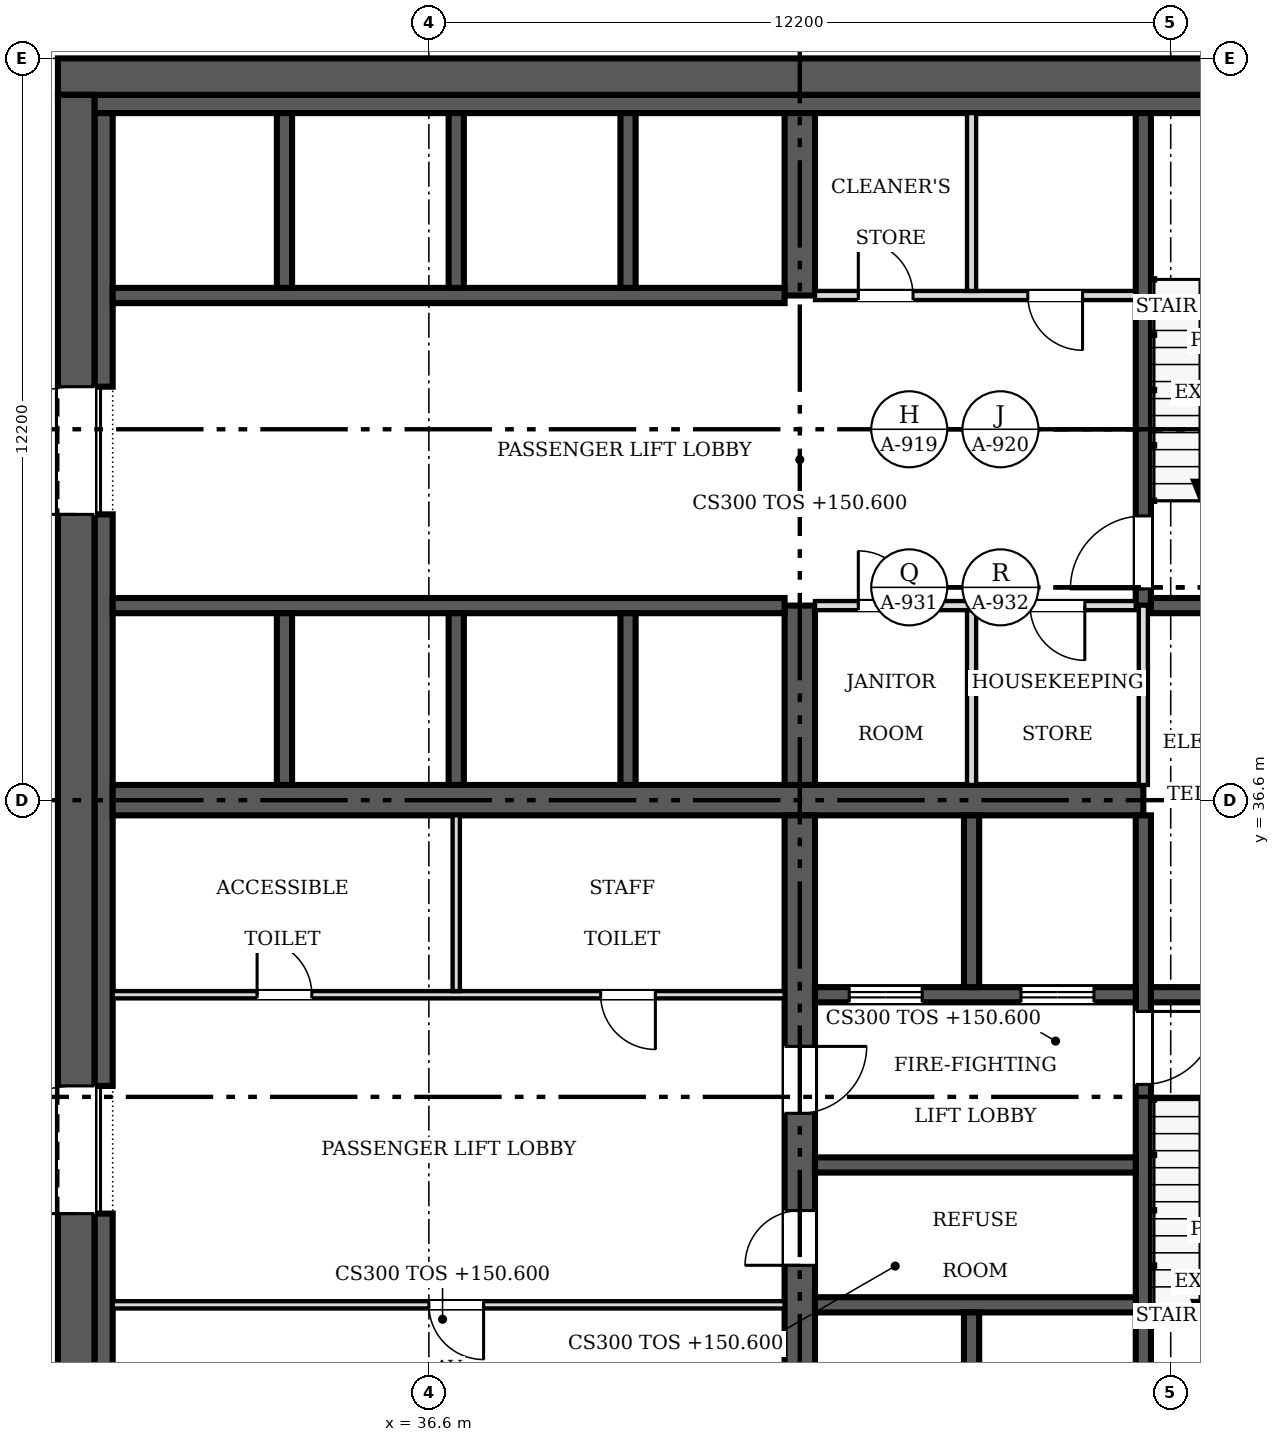
"""IFC4 building model, lengths in metres.
Left out: names, types, materials, properties, quantities, classifications, styles, units other than length and angle.
Written with IfcOpenShell. Run it as: python <this file> out.ifc"""

import sys

from ifc_helpers import new_model, si_unit, direction, frame, frame_2d, origin, place, context, subcontext, project, spatial, rectangle, extrude, source, transform, mapped, element, fill, save


model = new_model("IFC4")
c1 = context("Model", 3, precision=1e-05, world=origin(), true_north=direction((0.0, 1.0)))
c2 = subcontext(c1, "Body", "Model", "MODEL_VIEW")
j1 = project(units=[si_unit("LENGTHUNIT", "METRE"), si_unit("PLANEANGLEUNIT", "RADIAN")], contexts=[c1])
p1 = place(None, origin())
s1 = spatial("IfcSite", under=j1, at=p1, CompositionType="ELEMENT")
p2 = place(p1, origin())
s2 = spatial("IfcBuilding", under=s1, at=p2, CompositionType="ELEMENT")
p3 = place(p2, frame((0.0, 0.0, 150.6)))
s3 = spatial("IfcBuildingStorey", under=s2, at=p3, CompositionType="ELEMENT", Elevation=150.6)
p4 = place(p3, frame((30.8, 25.0, 0.0), z_axis=(0.0, 0.0, 1.0), x_axis=(0.0, 1.0, 0.0)))
e1 = element("IfcWall", 1, at=p4, inside=s3, PredefinedType="SHEAR", context=c2, shape_type="SweptSolid", body=[
    extrude(rectangle(XDim=23.2, YDim=0.6, at=frame_2d((11.6, 0.0))), origin(), (0.0, 0.0, 1.0), 4.8),
])
m1 = source(origin(), c2, "Body", "SweptSolid", [
    extrude(rectangle(XDim=2.1, YDim=2.4, at=frame_2d((1.05, 1.2))), frame((0.0, 0.31, 0.0), z_axis=(0.0, -1.0, 0.0), x_axis=(1.0, 0.0, 0.0)), (0.0, 0.0, 1.0), 0.62),
])
p5 = place(p4, frame((4.8, 0.0, 0.0)))
e2 = element("IfcOpeningElement", 2, at=p5, cuts=e1, PredefinedType="OPENING", context=c2, shape_type="MappedRepresentation", body=[
    mapped(m1, transform((0.0, 0.0, 0.0), scale=1.0)),
])
p6 = place(p4, frame((16.3, 0.0, 0.0)))
e3 = element("IfcOpeningElement", 3, at=p6, cuts=e1, PredefinedType="OPENING", context=c2, shape_type="MappedRepresentation", body=[
    mapped(m1, transform((0.0, 0.0, 0.0), scale=1.0)),
])
p7 = place(p3, frame((30.5, 48.5, 0.0), z_axis=(0.0, 0.0, 1.0), x_axis=(1.0, 0.0, 0.0)))
e4 = element("IfcWall", 4, at=p7, inside=s3, PredefinedType="SHEAR", context=c2, shape_type="SweptSolid", body=[
    extrude(rectangle(XDim=24.4, YDim=0.6, at=frame_2d((12.2, 0.0))), origin(), (0.0, 0.0, 1.0), 4.8),
])
p8 = place(p3, frame((31.1, 48.05, 0.0), z_axis=(0.0, 0.0, 1.0), x_axis=(1.0, 0.0, 0.0)))
e5 = element("IfcWall", 5, at=p8, inside=s3, PredefinedType="SOLIDWALL", context=c2, shape_type="SweptSolid", body=[
    extrude(rectangle(XDim=23.2, YDim=0.3, at=frame_2d((11.6, 0.0))), origin(), (0.0, 0.0, 1.0), 4.8),
])
p9 = place(p3, frame((31.25, 25.3, 0.0), z_axis=(0.0, 0.0, 1.0), x_axis=(0.0, 1.0, 0.0)))
e6 = element("IfcWall", 6, at=p9, inside=s3, PredefinedType="SOLIDWALL", context=c2, shape_type="SweptSolid", body=[
    extrude(rectangle(XDim=4.5, YDim=0.3, at=frame_2d((2.25, 0.0))), origin(), (0.0, 0.0, 1.0), 4.8),
])
p10 = place(p3, frame((31.25, 31.9, 0.0), z_axis=(0.0, 0.0, 1.0), x_axis=(0.0, 1.0, 0.0)))
e7 = element("IfcWall", 7, at=p10, inside=s3, PredefinedType="SOLIDWALL", context=c2, shape_type="SweptSolid", body=[
    extrude(rectangle(XDim=9.4, YDim=0.3, at=frame_2d((4.7, 0.0))), origin(), (0.0, 0.0, 1.0), 4.8),
])
p11 = place(p3, frame((31.25, 43.4, 0.0), z_axis=(0.0, 0.0, 1.0), x_axis=(0.0, 1.0, 0.0)))
e8 = element("IfcWall", 8, at=p11, inside=s3, PredefinedType="SOLIDWALL", context=c2, shape_type="SweptSolid", body=[
    extrude(rectangle(XDim=4.5, YDim=0.3, at=frame_2d((2.25, 0.0))), origin(), (0.0, 0.0, 1.0), 4.8),
])
p12 = place(p3, frame((31.4, 36.6, 0.0), z_axis=(0.0, 0.0, 1.0), x_axis=(1.0, 0.0, 0.0)))
e9 = element("IfcWall", 9, at=p12, inside=s3, PredefinedType="SHEAR", context=c2, shape_type="SweptSolid", body=[
    extrude(rectangle(XDim=16.95, YDim=0.5, at=frame_2d((8.475, 0.0))), origin(), (0.0, 0.0, 1.0), 4.8),
])
p13 = place(p3, frame((42.7, 36.35, 0.0), z_axis=(0.0, 0.0, 1.0), x_axis=(0.0, -1.0, 0.0)))
e10 = element("IfcWall", 10, at=p13, inside=s3, PredefinedType="SHEAR", context=c2, shape_type="SweptSolid", body=[
    extrude(rectangle(XDim=11.05, YDim=0.5, at=frame_2d((5.525, 0.0))), origin(), (0.0, 0.0, 1.0), 4.8),
])
m2 = source(origin(), c2, "Body", "SweptSolid", [
    extrude(rectangle(XDim=0.9, YDim=2.1, at=frame_2d((0.45, 1.05))), frame((0.0, 0.26, 0.0), z_axis=(0.0, -1.0, 0.0), x_axis=(1.0, 0.0, 0.0)), (0.0, 0.0, 1.0), 0.52),
])
p14 = place(p13, frame((6.5, 0.0, 0.0)))
e11 = element("IfcOpeningElement", 11, at=p14, cuts=e10, PredefinedType="OPENING", context=c2, shape_type="MappedRepresentation", body=[
    mapped(m2, transform((0.0, 0.0, 0.0), scale=1.0)),
])
m3 = source(origin(), c2, "Body", "SweptSolid", [
    extrude(rectangle(XDim=1.1, YDim=2.1, at=frame_2d((0.55, 1.05))), frame((0.0, 0.26, 0.0), z_axis=(0.0, -1.0, 0.0), x_axis=(1.0, 0.0, 0.0)), (0.0, 0.0, 1.0), 0.52),
])
p15 = place(p13, frame((3.8, 0.0, 0.0)))
e12 = element("IfcOpeningElement", 12, at=p15, cuts=e10, PredefinedType="OPENING", context=c2, shape_type="MappedRepresentation", body=[
    mapped(m3, transform((0.0, 0.0, 0.0), scale=1.0)),
])
p16 = place(p3, frame((42.7, 36.85, 0.0), z_axis=(0.0, 0.0, 1.0), x_axis=(0.0, 1.0, 0.0)))
e13 = element("IfcWall", 13, at=p16, inside=s3, PredefinedType="SHEAR", context=c2, shape_type="SweptSolid", body=[
    extrude(rectangle(XDim=2.95, YDim=0.5, at=frame_2d((1.475, 0.0))), origin(), (0.0, 0.0, 1.0), 4.8),
])
p17 = place(p3, frame((42.7, 44.9, 0.0), z_axis=(0.0, 0.0, 1.0), x_axis=(0.0, 1.0, 0.0)))
e14 = element("IfcWall", 14, at=p17, inside=s3, PredefinedType="SHEAR", context=c2, shape_type="SweptSolid", body=[
    extrude(rectangle(XDim=3.0, YDim=0.5, at=frame_2d((1.5, 0.0))), origin(), (0.0, 0.0, 1.0), 4.8),
])
for number, where, z_axis, x_axis in (
    (15, (31.4, 39.8, 0.0), (0.0, 0.0, 1.0), (1.0, 0.0, 0.0)),
    (16, (31.4, 44.9, 0.0), (0.0, 0.0, 1.0), (1.0, 0.0, 0.0)),
):
    element("IfcWall", number, at=place(p3, frame(where, z_axis=z_axis, x_axis=x_axis)), inside=s3, PredefinedType="SOLIDWALL", context=c2, shape_type="SweptSolid", body=[
        extrude(rectangle(XDim=11.05, YDim=0.25, at=frame_2d((5.525, 0.0))), origin(), (0.0, 0.0, 1.0), 4.8),
    ])
p18 = place(p3, frame((48.35, 36.35, 0.0), z_axis=(0.0, 0.0, 1.0), x_axis=(0.0, -1.0, 0.0)))
e17 = element("IfcWall", 17, at=p18, inside=s3, PredefinedType="SOLIDWALL", context=c2, shape_type="SweptSolid", body=[
    extrude(rectangle(XDim=11.05, YDim=0.25, at=frame_2d((5.525, 0.0))), origin(), (0.0, 0.0, 1.0), 4.8),
])
m4 = source(origin(), c2, "Body", "SweptSolid", [
    extrude(rectangle(XDim=1.2, YDim=2.1, at=frame_2d((0.6, 1.05))), frame((0.0, 0.135, 0.0), z_axis=(0.0, -1.0, 0.0), x_axis=(1.0, 0.0, 0.0)), (0.0, 0.0, 1.0), 0.27),
])
p19 = place(p18, frame((3.225, 0.0, 0.0)))
e18 = element("IfcOpeningElement", 18, at=p19, cuts=e17, PredefinedType="OPENING", context=c2, shape_type="MappedRepresentation", body=[
    mapped(m4, transform((0.0, 0.0, 0.0), scale=1.0)),
])
p20 = place(p3, frame((48.225, 33.4, 0.0), z_axis=(0.0, 0.0, 1.0), x_axis=(-1.0, 0.0, 0.0)))
e19 = element("IfcWall", 19, at=p20, inside=s3, PredefinedType="SOLIDWALL", context=c2, shape_type="SweptSolid", body=[
    extrude(rectangle(XDim=5.275, YDim=0.25, at=frame_2d((2.638, 0.0))), origin(), (0.0, 0.0, 1.0), 4.8),
])
p21 = place(p20, frame((3.512, 0.0, 0.0)))
e20 = element("IfcOpeningElement", 20, at=p21, cuts=e19, PredefinedType="OPENING", context=c2, shape_type="MappedRepresentation", body=[
    mapped(m4, transform((0.0, 0.0, 0.0), scale=1.0)),
])
p22 = place(p20, frame((0.688, 0.0, 0.0)))
e21 = element("IfcOpeningElement", 21, at=p22, cuts=e19, PredefinedType="OPENING", context=c2, shape_type="MappedRepresentation", body=[
    mapped(m4, transform((0.0, 0.0, 0.0), scale=1.0)),
])
p23 = place(p3, frame((48.475, 33.4, 0.0), z_axis=(0.0, 0.0, 1.0), x_axis=(1.0, 0.0, 0.0)))
e22 = element("IfcWall", 22, at=p23, inside=s3, PredefinedType="SOLIDWALL", context=c2, shape_type="SweptSolid", body=[
    extrude(rectangle(XDim=3.525, YDim=0.25, at=frame_2d((1.762, 0.0))), origin(), (0.0, 0.0, 1.0), 4.8),
])
p24 = place(p3, frame((48.35, 47.9, 0.0), z_axis=(0.0, 0.0, 1.0), x_axis=(0.0, -1.0, 0.0)))
e23 = element("IfcWall", 23, at=p24, inside=s3, PredefinedType="SOLIDWALL", context=c2, shape_type="SweptSolid", body=[
    extrude(rectangle(XDim=8.1, YDim=0.25, at=frame_2d((4.05, 0.0))), origin(), (0.0, 0.0, 1.0), 4.8),
])
p25 = place(p24, frame((6.625, 0.0, 0.0)))
e24 = element("IfcOpeningElement", 24, at=p25, cuts=e23, PredefinedType="OPENING", context=c2, shape_type="MappedRepresentation", body=[
    mapped(m4, transform((0.0, 0.0, 0.0), scale=1.0)),
])
for number, where, z_axis, x_axis in (
    (25, (42.95, 28.3, 0.0), (0.0, 0.0, 1.0), (1.0, 0.0, 0.0)),
    (26, (42.95, 30.6, 0.0), (0.0, 0.0, 1.0), (1.0, 0.0, 0.0)),
):
    element("IfcWall", number, at=place(p3, frame(where, z_axis=z_axis, x_axis=x_axis)), inside=s3, PredefinedType="SOLIDWALL", context=c2, shape_type="SweptSolid", body=[
        extrude(rectangle(XDim=5.275, YDim=0.25, at=frame_2d((2.638, 0.0))), origin(), (0.0, 0.0, 1.0), 4.8),
    ])
p26 = place(p3, frame((48.475, 39.8, 0.0), z_axis=(0.0, 0.0, 1.0), x_axis=(1.0, 0.0, 0.0)))
e27 = element("IfcWall", 27, at=p26, inside=s3, PredefinedType="SOLIDWALL", context=c2, shape_type="SweptSolid", body=[
    extrude(rectangle(XDim=3.4, YDim=0.25, at=frame_2d((1.7, 0.0))), origin(), (0.0, 0.0, 1.0), 4.8),
])
for number, where, z_axis, x_axis in (
    (28, (34.225, 36.85, 0.0), (0.0, 0.0, 1.0), (0.0, 1.0, 0.0)),
    (29, (37.05, 36.85, 0.0), (0.0, 0.0, 1.0), (0.0, 1.0, 0.0)),
    (30, (39.875, 36.85, 0.0), (0.0, 0.0, 1.0), (0.0, 1.0, 0.0)),
):
    element("IfcWall", number, at=place(p3, frame(where, z_axis=z_axis, x_axis=x_axis)), inside=s3, PredefinedType="SOLIDWALL", context=c2, shape_type="SweptSolid", body=[
        extrude(rectangle(XDim=2.825, YDim=0.25, at=frame_2d((1.413, 0.0))), origin(), (0.0, 0.0, 1.0), 4.8),
    ])
p27 = place(p3, frame((45.525, 33.525, 0.0), z_axis=(0.0, 0.0, 1.0), x_axis=(0.0, 1.0, 0.0)))
e31 = element("IfcWall", 31, at=p27, inside=s3, PredefinedType="SOLIDWALL", context=c2, shape_type="SweptSolid", body=[
    extrude(rectangle(XDim=2.825, YDim=0.25, at=frame_2d((1.413, 0.0))), origin(), (0.0, 0.0, 1.0), 4.8),
])
for number, where, z_axis, x_axis in (
    (32, (34.225, 45.025, 0.0), (0.0, 0.0, 1.0), (0.0, 1.0, 0.0)),
    (33, (37.05, 45.025, 0.0), (0.0, 0.0, 1.0), (0.0, 1.0, 0.0)),
    (34, (39.875, 45.025, 0.0), (0.0, 0.0, 1.0), (0.0, 1.0, 0.0)),
    (35, (45.525, 25.3, 0.0), (0.0, 0.0, 1.0), (0.0, 1.0, 0.0)),
):
    element("IfcWall", number, at=place(p3, frame(where, z_axis=z_axis, x_axis=x_axis)), inside=s3, PredefinedType="SOLIDWALL", context=c2, shape_type="SweptSolid", body=[
        extrude(rectangle(XDim=2.875, YDim=0.25, at=frame_2d((1.438, 0.0))), origin(), (0.0, 0.0, 1.0), 4.8),
    ])
p28 = place(p3, frame((42.45, 28.3, 0.0), z_axis=(0.0, 0.0, 1.0), x_axis=(-1.0, 0.0, 0.0)))
e36 = element("IfcWall", 36, at=p28, inside=s3, PredefinedType="PARTITIONING", context=c2, shape_type="SweptSolid", body=[
    extrude(rectangle(XDim=11.05, YDim=0.12, at=frame_2d((5.525, 0.0))), origin(), (0.0, 0.0, 1.0), 4.6),
])
m5 = source(origin(), c2, "Body", "SweptSolid", [
    extrude(rectangle(XDim=0.9, YDim=2.1, at=frame_2d((0.45, 1.05))), frame((0.0, 0.07, 0.0), z_axis=(0.0, -1.0, 0.0), x_axis=(1.0, 0.0, 0.0)), (0.0, 0.0, 1.0), 0.14),
])
p29 = place(p28, frame((4.95, 0.0, 0.0)))
e37 = element("IfcOpeningElement", 37, at=p29, cuts=e36, PredefinedType="OPENING", context=c2, shape_type="MappedRepresentation", body=[
    mapped(m5, transform((0.0, 0.0, 0.0), scale=1.0)),
])
p30 = place(p3, frame((31.4, 33.4, 0.0), z_axis=(0.0, 0.0, 1.0), x_axis=(1.0, 0.0, 0.0)))
e38 = element("IfcWall", 38, at=p30, inside=s3, PredefinedType="PARTITIONING", context=c2, shape_type="SweptSolid", body=[
    extrude(rectangle(XDim=11.05, YDim=0.12, at=frame_2d((5.525, 0.0))), origin(), (0.0, 0.0, 1.0), 4.6),
])
p31 = place(p30, frame((2.375, 0.0, 0.0)))
e39 = element("IfcOpeningElement", 39, at=p31, cuts=e38, PredefinedType="OPENING", context=c2, shape_type="MappedRepresentation", body=[
    mapped(m5, transform((0.0, 0.0, 0.0), scale=1.0)),
])
p32 = place(p30, frame((8.025, 0.0, 0.0)))
e40 = element("IfcOpeningElement", 40, at=p32, cuts=e38, PredefinedType="OPENING", context=c2, shape_type="MappedRepresentation", body=[
    mapped(m5, transform((0.0, 0.0, 0.0), scale=1.0)),
])
p33 = place(p3, frame((48.225, 39.8, 0.0), z_axis=(0.0, 0.0, 1.0), x_axis=(-1.0, 0.0, 0.0)))
e41 = element("IfcWall", 41, at=p33, inside=s3, PredefinedType="PARTITIONING", context=c2, shape_type="SweptSolid", body=[
    extrude(rectangle(XDim=5.275, YDim=0.15, at=frame_2d((2.638, 0.0))), origin(), (0.0, 0.0, 1.0), 4.6),
])
m6 = source(origin(), c2, "Body", "SweptSolid", [
    extrude(rectangle(XDim=0.9, YDim=2.1, at=frame_2d((0.45, 1.05))), frame((0.0, 0.085, 0.0), z_axis=(0.0, -1.0, 0.0), x_axis=(1.0, 0.0, 0.0)), (0.0, 0.0, 1.0), 0.17),
])
p34 = place(p33, frame((3.663, 0.0, 0.0)))
e42 = element("IfcOpeningElement", 42, at=p34, cuts=e41, PredefinedType="OPENING", context=c2, shape_type="MappedRepresentation", body=[
    mapped(m6, transform((0.0, 0.0, 0.0), scale=1.0)),
])
p35 = place(p33, frame((0.837, 0.0, 0.0)))
e43 = element("IfcOpeningElement", 43, at=p35, cuts=e41, PredefinedType="OPENING", context=c2, shape_type="MappedRepresentation", body=[
    mapped(m6, transform((0.0, 0.0, 0.0), scale=1.0)),
])
p36 = place(p3, frame((42.95, 44.9, 0.0), z_axis=(0.0, 0.0, 1.0), x_axis=(1.0, 0.0, 0.0)))
e44 = element("IfcWall", 44, at=p36, inside=s3, PredefinedType="PARTITIONING", context=c2, shape_type="SweptSolid", body=[
    extrude(rectangle(XDim=5.275, YDim=0.15, at=frame_2d((2.638, 0.0))), origin(), (0.0, 0.0, 1.0), 4.6),
])
p37 = place(p36, frame((0.712, 0.0, 0.0)))
e45 = element("IfcOpeningElement", 45, at=p37, cuts=e44, PredefinedType="OPENING", context=c2, shape_type="MappedRepresentation", body=[
    mapped(m6, transform((0.0, 0.0, 0.0), scale=1.0)),
])
p38 = place(p36, frame((3.5, 0.0, 0.0)))
e46 = element("IfcOpeningElement", 46, at=p38, cuts=e44, PredefinedType="OPENING", context=c2, shape_type="MappedRepresentation", body=[
    mapped(m6, transform((0.0, 0.0, 0.0), scale=1.0)),
])
p39 = place(p3, frame((45.525, 36.85, 0.0), z_axis=(0.0, 0.0, 1.0), x_axis=(0.0, 1.0, 0.0)))
e47 = element("IfcWall", 47, at=p39, inside=s3, PredefinedType="PARTITIONING", context=c2, shape_type="SweptSolid", body=[
    extrude(rectangle(XDim=2.875, YDim=0.15, at=frame_2d((1.438, 0.0))), origin(), (0.0, 0.0, 1.0), 4.6),
])
p40 = place(p3, frame((48.35, 36.85, 0.0), z_axis=(0.0, 0.0, 1.0), x_axis=(0.0, 1.0, 0.0)))
e48 = element("IfcWall", 48, at=p40, inside=s3, PredefinedType="PARTITIONING", context=c2, shape_type="SweptSolid", body=[
    extrude(rectangle(XDim=2.95, YDim=0.15, at=frame_2d((1.475, 0.0))), origin(), (0.0, 0.0, 1.0), 4.6),
])
p41 = place(p3, frame((37.05, 33.46, 0.0), z_axis=(0.0, 0.0, 1.0), x_axis=(0.0, 1.0, 0.0)))
e49 = element("IfcWall", 49, at=p41, inside=s3, PredefinedType="PARTITIONING", context=c2, shape_type="SweptSolid", body=[
    extrude(rectangle(XDim=2.89, YDim=0.12, at=frame_2d((1.445, 0.0))), origin(), (0.0, 0.0, 1.0), 4.6),
])
p42 = place(p3, frame((45.525, 44.975, 0.0), z_axis=(0.0, 0.0, 1.0), x_axis=(0.0, 1.0, 0.0)))
e50 = element("IfcWall", 50, at=p42, inside=s3, PredefinedType="PARTITIONING", context=c2, shape_type="SweptSolid", body=[
    extrude(rectangle(XDim=2.925, YDim=0.15, at=frame_2d((1.462, 0.0))), origin(), (0.0, 0.0, 1.0), 4.6),
])
m7 = source(origin(), c2, "Body", "SweptSolid", [
    extrude(rectangle(XDim=2.1, YDim=2.4, at=frame_2d((1.05, 1.2))), frame((0.0, 0.025, 0.0), z_axis=(0.0, -1.0, 0.0), x_axis=(1.0, 0.0, 0.0)), (0.0, 0.0, 1.0), 0.05),
])
p43 = place(p5, origin())
e51 = element("IfcDoor", 51, at=p43, inside=s3, OperationType="DOUBLE_DOOR_SINGLE_SWING", PredefinedType="DOOR", context=c2, shape_type="MappedRepresentation", body=[
    mapped(m7, transform((0.0, 0.0, 0.0), scale=1.0)),
])
fill(e2, e51)
p44 = place(p6, origin())
e52 = element("IfcDoor", 52, at=p44, inside=s3, OperationType="DOUBLE_DOOR_SINGLE_SWING", PredefinedType="DOOR", context=c2, shape_type="MappedRepresentation", body=[
    mapped(m7, transform((0.0, 0.0, 0.0), scale=1.0)),
])
fill(e3, e52)
m8 = source(origin(), c2, "Body", "SweptSolid", [
    extrude(rectangle(XDim=0.9, YDim=2.1, at=frame_2d((0.45, 1.05))), frame((0.0, 0.025, 0.0), z_axis=(0.0, -1.0, 0.0), x_axis=(1.0, 0.0, 0.0)), (0.0, 0.0, 1.0), 0.05),
])
p45 = place(p14, origin())
e53 = element("IfcDoor", 53, at=p45, inside=s3, OperationType="SINGLE_SWING_RIGHT", PredefinedType="DOOR", context=c2, shape_type="MappedRepresentation", body=[
    mapped(m8, transform((0.0, 0.0, 0.0), scale=1.0)),
])
fill(e11, e53)
m9 = source(origin(), c2, "Body", "SweptSolid", [
    extrude(rectangle(XDim=1.1, YDim=2.1, at=frame_2d((0.55, 1.05))), frame((0.0, 0.025, 0.0), z_axis=(0.0, -1.0, 0.0), x_axis=(1.0, 0.0, 0.0)), (0.0, 0.0, 1.0), 0.05),
])
p46 = place(p15, origin())
e54 = element("IfcDoor", 54, at=p46, inside=s3, OperationType="SINGLE_SWING_LEFT", PredefinedType="DOOR", context=c2, shape_type="MappedRepresentation", body=[
    mapped(m9, transform((0.0, 0.0, 0.0), scale=1.0)),
])
fill(e12, e54)
m10 = source(origin(), c2, "Body", "SweptSolid", [
    extrude(rectangle(XDim=1.2, YDim=2.1, at=frame_2d((0.6, 1.05))), frame((0.0, 0.025, 0.0), z_axis=(0.0, -1.0, 0.0), x_axis=(1.0, 0.0, 0.0)), (0.0, 0.0, 1.0), 0.05),
])
p47 = place(p19, origin())
e55 = element("IfcDoor", 55, at=p47, inside=s3, OperationType="SINGLE_SWING_LEFT", PredefinedType="DOOR", context=c2, shape_type="MappedRepresentation", body=[
    mapped(m10, transform((0.0, 0.0, 0.0), scale=1.0)),
])
fill(e18, e55)
p48 = place(p21, origin())
e56 = element("IfcDoor", 56, at=p48, inside=s3, OperationType="DOUBLE_DOOR_SLIDING", PredefinedType="DOOR", context=c2, shape_type="MappedRepresentation", body=[
    mapped(m10, transform((0.0, 0.0, 0.0), scale=1.0)),
])
fill(e20, e56)
p49 = place(p22, origin())
e57 = element("IfcDoor", 57, at=p49, inside=s3, OperationType="DOUBLE_DOOR_SLIDING", PredefinedType="DOOR", context=c2, shape_type="MappedRepresentation", body=[
    mapped(m10, transform((0.0, 0.0, 0.0), scale=1.0)),
])
fill(e21, e57)
p50 = place(p25, origin())
e58 = element("IfcDoor", 58, at=p50, inside=s3, OperationType="SINGLE_SWING_RIGHT", PredefinedType="DOOR", context=c2, shape_type="MappedRepresentation", body=[
    mapped(m10, transform((0.0, 0.0, 0.0), scale=1.0)),
])
fill(e24, e58)
p51 = place(p29, origin())
e59 = element("IfcDoor", 59, at=p51, inside=s3, OperationType="SINGLE_SWING_LEFT", PredefinedType="DOOR", context=c2, shape_type="MappedRepresentation", body=[
    mapped(m8, transform((0.0, 0.0, 0.0), scale=1.0)),
])
fill(e37, e59)
p52 = place(p31, origin())
e60 = element("IfcDoor", 60, at=p52, inside=s3, OperationType="SINGLE_SWING_LEFT", PredefinedType="DOOR", context=c2, shape_type="MappedRepresentation", body=[
    mapped(m8, transform((0.0, 0.0, 0.0), scale=1.0)),
])
fill(e39, e60)
p53 = place(p32, origin())
e61 = element("IfcDoor", 61, at=p53, inside=s3, OperationType="SINGLE_SWING_RIGHT", PredefinedType="DOOR", context=c2, shape_type="MappedRepresentation", body=[
    mapped(m8, transform((0.0, 0.0, 0.0), scale=1.0)),
])
fill(e40, e61)
p54 = place(p34, origin())
e62 = element("IfcDoor", 62, at=p54, inside=s3, OperationType="SINGLE_SWING_RIGHT", PredefinedType="DOOR", context=c2, shape_type="MappedRepresentation", body=[
    mapped(m8, transform((0.0, 0.0, 0.0), scale=1.0)),
])
fill(e42, e62)
p55 = place(p35, origin())
e63 = element("IfcDoor", 63, at=p55, inside=s3, OperationType="SINGLE_SWING_LEFT", PredefinedType="DOOR", context=c2, shape_type="MappedRepresentation", body=[
    mapped(m8, transform((0.0, 0.0, 0.0), scale=1.0)),
])
fill(e43, e63)
p56 = place(p37, origin())
e64 = element("IfcDoor", 64, at=p56, inside=s3, OperationType="SINGLE_SWING_LEFT", PredefinedType="DOOR", context=c2, shape_type="MappedRepresentation", body=[
    mapped(m8, transform((0.0, 0.0, 0.0), scale=1.0)),
])
fill(e45, e64)
p57 = place(p38, origin())
e65 = element("IfcDoor", 65, at=p57, inside=s3, OperationType="SINGLE_SWING_RIGHT", PredefinedType="DOOR", context=c2, shape_type="MappedRepresentation", body=[
    mapped(m8, transform((0.0, 0.0, 0.0), scale=1.0)),
])
fill(e46, e65)
save(model, sys.argv[1])
